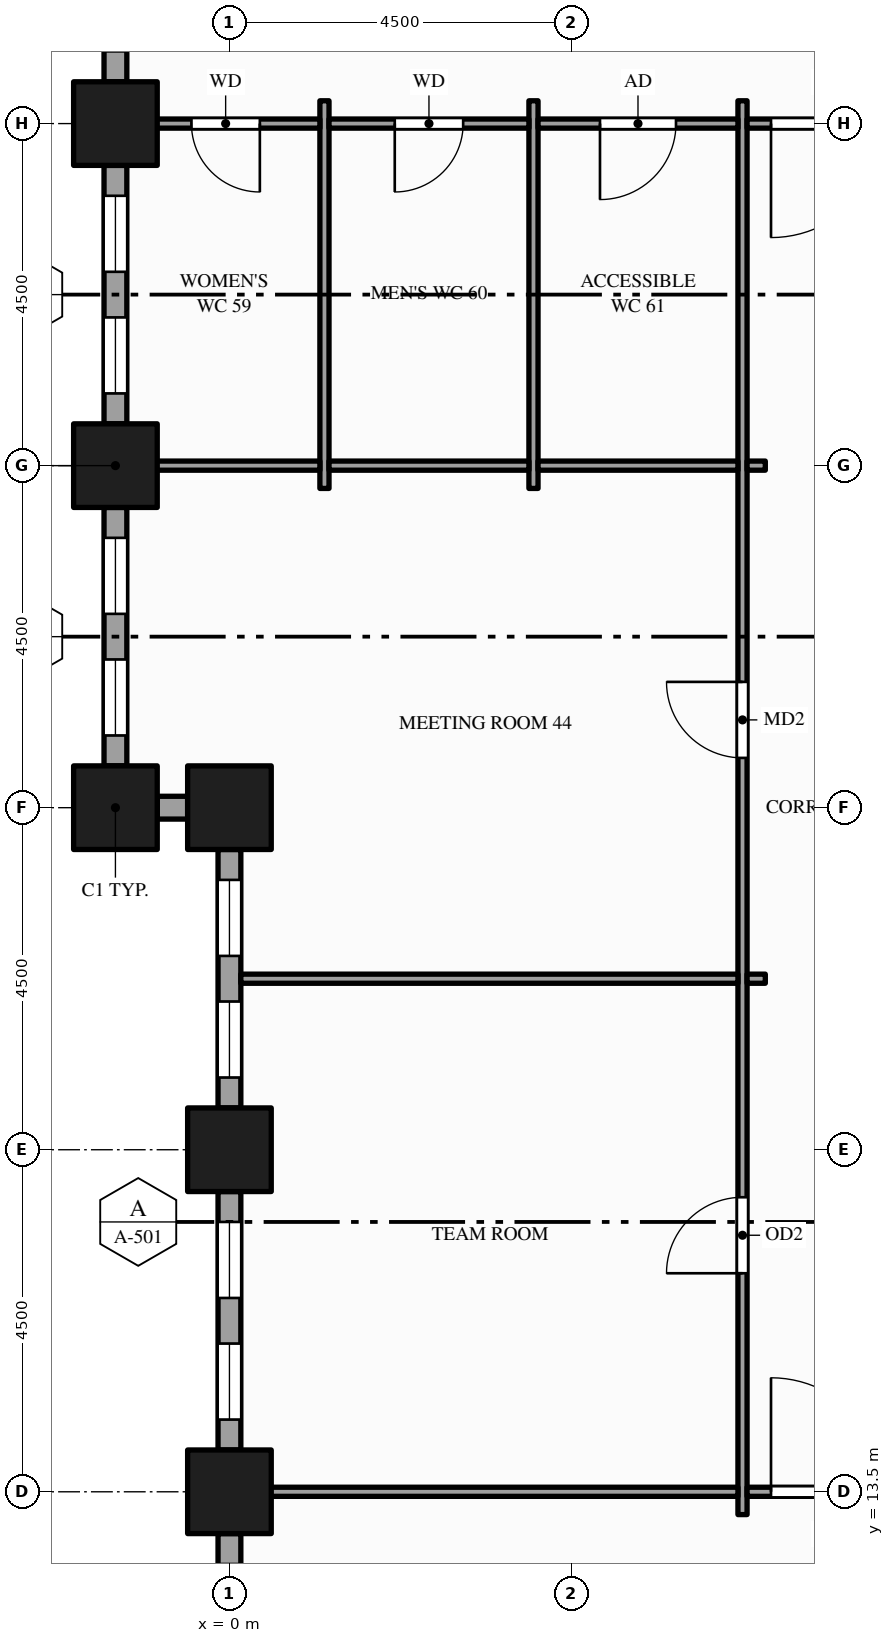
"""IFC4 building model, lengths in metres.
Left out: names, types, materials, properties, quantities, classifications, styles, units other than length and angle.
Written with IfcOpenShell. Run it as: python <this file> out.ifc"""

import sys

from ifc_helpers import new_model, si_unit, direction, frame, frame_2d, origin, origin_2d, place, context, subcontext, project, spatial, rectangle, hollow_rectangle, extrude, element, fill, save


model = new_model("IFC4")
c1 = context("Model", 3, precision=1e-05, world=origin(), true_north=direction((0.0, 1.0)))
c2 = subcontext(c1, "Body", "Model", "MODEL_VIEW")
j1 = project(units=[si_unit("LENGTHUNIT", "METRE"), si_unit("PLANEANGLEUNIT", "RADIAN")], contexts=[c1])
p1 = place(None, origin())
s1 = spatial("IfcSite", under=j1, at=p1, CompositionType="ELEMENT")
p2 = place(p1, origin())
s2 = spatial("IfcBuilding", under=s1, at=p2, CompositionType="ELEMENT")
p3 = place(p2, frame((0.0, 0.0, 41.0)))
s3 = spatial("IfcBuildingStorey", under=s2, at=p3, CompositionType="ELEMENT", Elevation=41.0)
for number, where, z_axis, x_axis in (
    (1, (-1.5, 22.5, -0.15), (0.0, 0.0, 1.0), (1.0, 0.0, 0.0)),
    (2, (-1.5, 27.0, -0.15), (0.0, 0.0, 1.0), (1.0, 0.0, 0.0)),
    (3, (-1.5, 31.5, -0.15), (0.0, 0.0, 1.0), (1.0, 0.0, 0.0)),
    (4, (0.0, 13.5, -0.15), (0.0, 0.0, 1.0), (1.0, 0.0, 0.0)),
    (5, (0.0, 18.0, -0.15), (0.0, 0.0, 1.0), (1.0, 0.0, 0.0)),
    (6, (0.0, 22.5, -0.15), (0.0, 0.0, 1.0), (1.0, 0.0, 0.0)),
):
    element("IfcColumn", number, at=place(p3, frame(where, z_axis=z_axis, x_axis=x_axis)), inside=s3, PredefinedType="COLUMN", context=c2, shape_type="SweptSolid", body=[
        extrude(hollow_rectangle(XDim=1.1, YDim=1.1, WallThickness=0.06, at=origin_2d()), origin(), (0.0, 0.0, 1.0), 4.0),
    ])
p4 = place(p3, frame((-1.5, 35.45, 0.0), z_axis=(0.0, 0.0, 1.0), x_axis=(0.0, -1.0, 0.0)))
e7 = element("IfcWall", 7, at=p4, inside=s3, PredefinedType="STANDARD", context=c2, shape_type="SweptSolid", body=[
    extrude(rectangle(XDim=3.4, YDim=0.3, at=frame_2d((1.7, 0.0))), origin(), (0.0, 0.0, 1.0), 3.144),
])
p5 = place(p4, frame((0.4, 0.0, 0.9)))
e8 = element("IfcOpeningElement", 8, at=p5, cuts=e7, PredefinedType="OPENING", context=c2, shape_type="SweptSolid", body=[
    extrude(rectangle(XDim=1.0, YDim=2.0, at=frame_2d((0.5, 1.0))), frame((0.0, 0.16, 0.0), z_axis=(0.0, -1.0, 0.0), x_axis=(1.0, 0.0, 0.0)), (0.0, 0.0, 1.0), 0.32),
])
p6 = place(p4, frame((2.0, 0.0, 0.9)))
e9 = element("IfcOpeningElement", 9, at=p6, cuts=e7, PredefinedType="OPENING", context=c2, shape_type="SweptSolid", body=[
    extrude(rectangle(XDim=1.0, YDim=2.0, at=frame_2d((0.5, 1.0))), frame((0.0, 0.16, 0.0), z_axis=(0.0, -1.0, 0.0), x_axis=(1.0, 0.0, 0.0)), (0.0, 0.0, 1.0), 0.32),
])
p7 = place(p3, frame((-1.5, 30.95, 0.0), z_axis=(0.0, 0.0, 1.0), x_axis=(0.0, -1.0, 0.0)))
e10 = element("IfcWall", 10, at=p7, inside=s3, PredefinedType="STANDARD", context=c2, shape_type="SweptSolid", body=[
    extrude(rectangle(XDim=3.4, YDim=0.3, at=frame_2d((1.7, 0.0))), origin(), (0.0, 0.0, 1.0), 3.144),
])
p8 = place(p7, frame((0.4, 0.0, 0.9)))
e11 = element("IfcOpeningElement", 11, at=p8, cuts=e10, PredefinedType="OPENING", context=c2, shape_type="SweptSolid", body=[
    extrude(rectangle(XDim=1.0, YDim=2.0, at=frame_2d((0.5, 1.0))), frame((0.0, 0.16, 0.0), z_axis=(0.0, -1.0, 0.0), x_axis=(1.0, 0.0, 0.0)), (0.0, 0.0, 1.0), 0.32),
])
p9 = place(p7, frame((2.0, 0.0, 0.9)))
e12 = element("IfcOpeningElement", 12, at=p9, cuts=e10, PredefinedType="OPENING", context=c2, shape_type="SweptSolid", body=[
    extrude(rectangle(XDim=1.0, YDim=2.0, at=frame_2d((0.5, 1.0))), frame((0.0, 0.16, 0.0), z_axis=(0.0, -1.0, 0.0), x_axis=(1.0, 0.0, 0.0)), (0.0, 0.0, 1.0), 0.32),
])
p10 = place(p3, frame((-1.5, 26.45, 0.0), z_axis=(0.0, 0.0, 1.0), x_axis=(0.0, -1.0, 0.0)))
e13 = element("IfcWall", 13, at=p10, inside=s3, PredefinedType="STANDARD", context=c2, shape_type="SweptSolid", body=[
    extrude(rectangle(XDim=3.4, YDim=0.3, at=frame_2d((1.7, 0.0))), origin(), (0.0, 0.0, 1.0), 3.144),
])
p11 = place(p10, frame((0.4, 0.0, 0.9)))
e14 = element("IfcOpeningElement", 14, at=p11, cuts=e13, PredefinedType="OPENING", context=c2, shape_type="SweptSolid", body=[
    extrude(rectangle(XDim=1.0, YDim=2.0, at=frame_2d((0.5, 1.0))), frame((0.0, 0.16, 0.0), z_axis=(0.0, -1.0, 0.0), x_axis=(1.0, 0.0, 0.0)), (0.0, 0.0, 1.0), 0.32),
])
p12 = place(p10, frame((2.0, 0.0, 0.9)))
e15 = element("IfcOpeningElement", 15, at=p12, cuts=e13, PredefinedType="OPENING", context=c2, shape_type="SweptSolid", body=[
    extrude(rectangle(XDim=1.0, YDim=2.0, at=frame_2d((0.5, 1.0))), frame((0.0, 0.16, 0.0), z_axis=(0.0, -1.0, 0.0), x_axis=(1.0, 0.0, 0.0)), (0.0, 0.0, 1.0), 0.32),
])
p13 = place(p3, frame((-0.95, 22.5, 0.0), z_axis=(0.0, 0.0, 1.0), x_axis=(1.0, 0.0, 0.0)))
e16 = element("IfcWall", 16, at=p13, inside=s3, PredefinedType="STANDARD", context=c2, shape_type="SweptSolid", body=[
    extrude(rectangle(XDim=0.4, YDim=0.3, at=frame_2d((0.2, 0.0))), origin(), (0.0, 0.0, 1.0), 3.144),
])
p14 = place(p3, frame((0.0, 21.95, 0.0), z_axis=(0.0, 0.0, 1.0), x_axis=(0.0, -1.0, 0.0)))
e17 = element("IfcWall", 17, at=p14, inside=s3, PredefinedType="STANDARD", context=c2, shape_type="SweptSolid", body=[
    extrude(rectangle(XDim=3.4, YDim=0.3, at=frame_2d((1.7, 0.0))), origin(), (0.0, 0.0, 1.0), 3.144),
])
p15 = place(p14, frame((0.4, 0.0, 0.9)))
e18 = element("IfcOpeningElement", 18, at=p15, cuts=e17, PredefinedType="OPENING", context=c2, shape_type="SweptSolid", body=[
    extrude(rectangle(XDim=1.0, YDim=2.0, at=frame_2d((0.5, 1.0))), frame((0.0, 0.16, 0.0), z_axis=(0.0, -1.0, 0.0), x_axis=(1.0, 0.0, 0.0)), (0.0, 0.0, 1.0), 0.32),
])
p16 = place(p14, frame((2.0, 0.0, 0.9)))
e19 = element("IfcOpeningElement", 19, at=p16, cuts=e17, PredefinedType="OPENING", context=c2, shape_type="SweptSolid", body=[
    extrude(rectangle(XDim=1.0, YDim=2.0, at=frame_2d((0.5, 1.0))), frame((0.0, 0.16, 0.0), z_axis=(0.0, -1.0, 0.0), x_axis=(1.0, 0.0, 0.0)), (0.0, 0.0, 1.0), 0.32),
])
p17 = place(p3, frame((0.0, 17.45, 0.0), z_axis=(0.0, 0.0, 1.0), x_axis=(0.0, -1.0, 0.0)))
e20 = element("IfcWall", 20, at=p17, inside=s3, PredefinedType="STANDARD", context=c2, shape_type="SweptSolid", body=[
    extrude(rectangle(XDim=3.4, YDim=0.3, at=frame_2d((1.7, 0.0))), origin(), (0.0, 0.0, 1.0), 3.144),
])
p18 = place(p17, frame((0.4, 0.0, 0.9)))
e21 = element("IfcOpeningElement", 21, at=p18, cuts=e20, PredefinedType="OPENING", context=c2, shape_type="SweptSolid", body=[
    extrude(rectangle(XDim=1.0, YDim=2.0, at=frame_2d((0.5, 1.0))), frame((0.0, 0.16, 0.0), z_axis=(0.0, -1.0, 0.0), x_axis=(1.0, 0.0, 0.0)), (0.0, 0.0, 1.0), 0.32),
])
p19 = place(p17, frame((2.0, 0.0, 0.9)))
e22 = element("IfcOpeningElement", 22, at=p19, cuts=e20, PredefinedType="OPENING", context=c2, shape_type="SweptSolid", body=[
    extrude(rectangle(XDim=1.0, YDim=2.0, at=frame_2d((0.5, 1.0))), frame((0.0, 0.16, 0.0), z_axis=(0.0, -1.0, 0.0), x_axis=(1.0, 0.0, 0.0)), (0.0, 0.0, 1.0), 0.32),
])
p20 = place(p3, frame((0.0, 12.95, 0.0), z_axis=(0.0, 0.0, 1.0), x_axis=(0.0, -1.0, 0.0)))
e23 = element("IfcWall", 23, at=p20, inside=s3, PredefinedType="STANDARD", context=c2, shape_type="SweptSolid", body=[
    extrude(rectangle(XDim=3.4, YDim=0.3, at=frame_2d((1.7, 0.0))), origin(), (0.0, 0.0, 1.0), 3.144),
])
p21 = place(p20, frame((0.4, 0.0, 0.9)))
e24 = element("IfcOpeningElement", 24, at=p21, cuts=e23, PredefinedType="OPENING", context=c2, shape_type="SweptSolid", body=[
    extrude(rectangle(XDim=1.0, YDim=2.0, at=frame_2d((0.5, 1.0))), frame((0.0, 0.16, 0.0), z_axis=(0.0, -1.0, 0.0), x_axis=(1.0, 0.0, 0.0)), (0.0, 0.0, 1.0), 0.32),
])
p22 = place(p20, frame((2.0, 0.0, 0.9)))
e25 = element("IfcOpeningElement", 25, at=p22, cuts=e23, PredefinedType="OPENING", context=c2, shape_type="SweptSolid", body=[
    extrude(rectangle(XDim=1.0, YDim=2.0, at=frame_2d((0.5, 1.0))), frame((0.0, 0.16, 0.0), z_axis=(0.0, -1.0, 0.0), x_axis=(1.0, 0.0, 0.0)), (0.0, 0.0, 1.0), 0.32),
])
for number, where, z_axis, x_axis in (
    (26, (1.25, 26.7, 0.0), (0.0, 0.0, 1.0), (0.0, 1.0, 0.0)),
    (27, (4.0, 26.7, 0.0), (0.0, 0.0, 1.0), (0.0, 1.0, 0.0)),
):
    element("IfcWall", number, at=place(p3, frame(where, z_axis=z_axis, x_axis=x_axis)), inside=s3, PredefinedType="PARTITIONING", context=c2, shape_type="SweptSolid", body=[
        extrude(rectangle(XDim=5.1, YDim=0.12, at=frame_2d((2.55, 0.0))), origin(), (0.0, 0.0, 1.0), 3.85),
    ])
p23 = place(p3, frame((6.75, 13.2, 0.0), z_axis=(0.0, 0.0, 1.0), x_axis=(0.0, 1.0, 0.0)))
e28 = element("IfcWall", 28, at=p23, inside=s3, PredefinedType="PARTITIONING", context=c2, shape_type="SweptSolid", body=[
    extrude(rectangle(XDim=18.6, YDim=0.12, at=frame_2d((9.3, 0.0))), origin(), (0.0, 0.0, 1.0), 2.6),
])
p24 = place(p23, frame((3.175, 0.0, 0.0)))
e29 = element("IfcOpeningElement", 29, at=p24, cuts=e28, PredefinedType="OPENING", context=c2, shape_type="SweptSolid", body=[
    extrude(rectangle(XDim=1.0, YDim=2.1, at=frame_2d((0.5, 1.05))), frame((0.0, 0.07, 0.0), z_axis=(0.0, -1.0, 0.0), x_axis=(1.0, 0.0, 0.0)), (0.0, 0.0, 1.0), 0.14),
])
p25 = place(p23, frame((9.955, 0.0, 0.0)))
e30 = element("IfcOpeningElement", 30, at=p25, cuts=e28, PredefinedType="OPENING", context=c2, shape_type="SweptSolid", body=[
    extrude(rectangle(XDim=1.0, YDim=2.1, at=frame_2d((0.5, 1.05))), frame((0.0, 0.07, 0.0), z_axis=(0.0, -1.0, 0.0), x_axis=(1.0, 0.0, 0.0)), (0.0, 0.0, 1.0), 0.14),
])
p26 = place(p3, frame((0.15, 13.5, 0.0), z_axis=(0.0, 0.0, 1.0), x_axis=(1.0, 0.0, 0.0)))
e31 = element("IfcWall", 31, at=p26, inside=s3, PredefinedType="PARTITIONING", context=c2, shape_type="SweptSolid", body=[
    extrude(rectangle(XDim=6.54, YDim=0.12, at=frame_2d((3.27, 0.0))), origin(), (0.0, 0.0, 1.0), 2.938),
])
p27 = place(p3, frame((6.81, 13.5, 0.0), z_axis=(0.0, 0.0, 1.0), x_axis=(1.0, 0.0, 0.0)))
e32 = element("IfcWall", 32, at=p27, inside=s3, PredefinedType="PARTITIONING", context=c2, shape_type="SweptSolid", body=[
    extrude(rectangle(XDim=2.13, YDim=0.12, at=frame_2d((1.065, 0.0))), origin(), (0.0, 0.0, 1.0), 2.938),
])
p28 = place(p27, frame((0.315, 0.0, 0.0)))
e33 = element("IfcOpeningElement", 33, at=p28, cuts=e32, PredefinedType="OPENING", context=c2, shape_type="SweptSolid", body=[
    extrude(rectangle(XDim=1.5, YDim=2.1, at=frame_2d((0.75, 1.05))), frame((0.0, 0.07, 0.0), z_axis=(0.0, -1.0, 0.0), x_axis=(1.0, 0.0, 0.0)), (0.0, 0.0, 1.0), 0.14),
])
p29 = place(p3, frame((0.15, 20.25, 0.0), z_axis=(0.0, 0.0, 1.0), x_axis=(1.0, 0.0, 0.0)))
e34 = element("IfcWall", 34, at=p29, inside=s3, PredefinedType="PARTITIONING", context=c2, shape_type="SweptSolid", body=[
    extrude(rectangle(XDim=6.54, YDim=0.12, at=frame_2d((3.27, 0.0))), origin(), (0.0, 0.0, 1.0), 2.938),
])
p30 = place(p3, frame((6.81, 20.25, 0.0), z_axis=(0.0, 0.0, 1.0), x_axis=(1.0, 0.0, 0.0)))
e35 = element("IfcWall", 35, at=p30, inside=s3, PredefinedType="PARTITIONING", context=c2, shape_type="SweptSolid", body=[
    extrude(rectangle(XDim=0.24, YDim=0.12, at=frame_2d((0.12, 0.0))), origin(), (0.0, 0.0, 1.0), 2.938),
])
p31 = place(p3, frame((-1.35, 27.0, 0.0), z_axis=(0.0, 0.0, 1.0), x_axis=(1.0, 0.0, 0.0)))
e36 = element("IfcWall", 36, at=p31, inside=s3, PredefinedType="PARTITIONING", context=c2, shape_type="SweptSolid", body=[
    extrude(rectangle(XDim=2.54, YDim=0.12, at=frame_2d((1.27, 0.0))), origin(), (0.0, 0.0, 1.0), 2.938),
])
for number, where, z_axis, x_axis in (
    (37, (1.31, 27.0, 0.0), (0.0, 0.0, 1.0), (1.0, 0.0, 0.0)),
    (38, (4.06, 27.0, 0.0), (0.0, 0.0, 1.0), (1.0, 0.0, 0.0)),
):
    element("IfcWall", number, at=place(p3, frame(where, z_axis=z_axis, x_axis=x_axis)), inside=s3, PredefinedType="PARTITIONING", context=c2, shape_type="SweptSolid", body=[
        extrude(rectangle(XDim=2.63, YDim=0.12, at=frame_2d((1.315, 0.0))), origin(), (0.0, 0.0, 1.0), 2.938),
    ])
p32 = place(p3, frame((6.81, 27.0, 0.0), z_axis=(0.0, 0.0, 1.0), x_axis=(1.0, 0.0, 0.0)))
e39 = element("IfcWall", 39, at=p32, inside=s3, PredefinedType="PARTITIONING", context=c2, shape_type="SweptSolid", body=[
    extrude(rectangle(XDim=0.24, YDim=0.12, at=frame_2d((0.12, 0.0))), origin(), (0.0, 0.0, 1.0), 2.938),
])
p33 = place(p3, frame((-1.35, 31.5, 0.0), z_axis=(0.0, 0.0, 1.0), x_axis=(1.0, 0.0, 0.0)))
e40 = element("IfcWall", 40, at=p33, inside=s3, PredefinedType="PARTITIONING", context=c2, shape_type="SweptSolid", body=[
    extrude(rectangle(XDim=2.54, YDim=0.12, at=frame_2d((1.27, 0.0))), origin(), (0.0, 0.0, 1.0), 2.938),
])
p34 = place(p33, frame((0.85, 0.0, 0.0)))
e41 = element("IfcOpeningElement", 41, at=p34, cuts=e40, PredefinedType="OPENING", context=c2, shape_type="SweptSolid", body=[
    extrude(rectangle(XDim=0.9, YDim=2.1, at=frame_2d((0.45, 1.05))), frame((0.0, 0.07, 0.0), z_axis=(0.0, -1.0, 0.0), x_axis=(1.0, 0.0, 0.0)), (0.0, 0.0, 1.0), 0.14),
])
p35 = place(p3, frame((1.31, 31.5, 0.0), z_axis=(0.0, 0.0, 1.0), x_axis=(1.0, 0.0, 0.0)))
e42 = element("IfcWall", 42, at=p35, inside=s3, PredefinedType="PARTITIONING", context=c2, shape_type="SweptSolid", body=[
    extrude(rectangle(XDim=2.63, YDim=0.12, at=frame_2d((1.315, 0.0))), origin(), (0.0, 0.0, 1.0), 2.938),
])
p36 = place(p35, frame((0.865, 0.0, 0.0)))
e43 = element("IfcOpeningElement", 43, at=p36, cuts=e42, PredefinedType="OPENING", context=c2, shape_type="SweptSolid", body=[
    extrude(rectangle(XDim=0.9, YDim=2.1, at=frame_2d((0.45, 1.05))), frame((0.0, 0.07, 0.0), z_axis=(0.0, -1.0, 0.0), x_axis=(1.0, 0.0, 0.0)), (0.0, 0.0, 1.0), 0.14),
])
p37 = place(p3, frame((4.06, 31.5, 0.0), z_axis=(0.0, 0.0, 1.0), x_axis=(1.0, 0.0, 0.0)))
e44 = element("IfcWall", 44, at=p37, inside=s3, PredefinedType="PARTITIONING", context=c2, shape_type="SweptSolid", body=[
    extrude(rectangle(XDim=2.63, YDim=0.12, at=frame_2d((1.315, 0.0))), origin(), (0.0, 0.0, 1.0), 2.938),
])
p38 = place(p37, frame((0.815, 0.0, 0.0)))
e45 = element("IfcOpeningElement", 45, at=p38, cuts=e44, PredefinedType="OPENING", context=c2, shape_type="SweptSolid", body=[
    extrude(rectangle(XDim=1.0, YDim=2.1, at=frame_2d((0.5, 1.05))), frame((0.0, 0.07, 0.0), z_axis=(0.0, -1.0, 0.0), x_axis=(1.0, 0.0, 0.0)), (0.0, 0.0, 1.0), 0.14),
])
p39 = place(p3, frame((6.81, 31.5, 0.0), z_axis=(0.0, 0.0, 1.0), x_axis=(1.0, 0.0, 0.0)))
e46 = element("IfcWall", 46, at=p39, inside=s3, PredefinedType="PARTITIONING", context=c2, shape_type="SweptSolid", body=[
    extrude(rectangle(XDim=2.13, YDim=0.12, at=frame_2d((1.065, 0.0))), origin(), (0.0, 0.0, 1.0), 2.938),
])
p40 = place(p39, frame((0.315, 0.0, 0.0)))
e47 = element("IfcOpeningElement", 47, at=p40, cuts=e46, PredefinedType="OPENING", context=c2, shape_type="SweptSolid", body=[
    extrude(rectangle(XDim=1.5, YDim=2.1, at=frame_2d((0.75, 1.05))), frame((0.0, 0.07, 0.0), z_axis=(0.0, -1.0, 0.0), x_axis=(1.0, 0.0, 0.0)), (0.0, 0.0, 1.0), 0.14),
])
p41 = place(p8, origin())
e48 = element("IfcWindow", 48, at=p41, inside=s3, PartitioningType="SINGLE_PANEL", PredefinedType="WINDOW", context=c2, shape_type="SweptSolid", body=[
    extrude(rectangle(XDim=1.0, YDim=2.0, at=frame_2d((0.5, 1.0))), frame((0.0, 0.03, 0.0), z_axis=(0.0, -1.0, 0.0), x_axis=(1.0, 0.0, 0.0)), (0.0, 0.0, 1.0), 0.06),
])
fill(e11, e48)
p42 = place(p9, origin())
e49 = element("IfcWindow", 49, at=p42, inside=s3, PartitioningType="SINGLE_PANEL", PredefinedType="WINDOW", context=c2, shape_type="SweptSolid", body=[
    extrude(rectangle(XDim=1.0, YDim=2.0, at=frame_2d((0.5, 1.0))), frame((0.0, 0.03, 0.0), z_axis=(0.0, -1.0, 0.0), x_axis=(1.0, 0.0, 0.0)), (0.0, 0.0, 1.0), 0.06),
])
fill(e12, e49)
p43 = place(p11, origin())
e50 = element("IfcWindow", 50, at=p43, inside=s3, PartitioningType="SINGLE_PANEL", PredefinedType="WINDOW", context=c2, shape_type="SweptSolid", body=[
    extrude(rectangle(XDim=1.0, YDim=2.0, at=frame_2d((0.5, 1.0))), frame((0.0, 0.03, 0.0), z_axis=(0.0, -1.0, 0.0), x_axis=(1.0, 0.0, 0.0)), (0.0, 0.0, 1.0), 0.06),
])
fill(e14, e50)
p44 = place(p12, origin())
e51 = element("IfcWindow", 51, at=p44, inside=s3, PartitioningType="SINGLE_PANEL", PredefinedType="WINDOW", context=c2, shape_type="SweptSolid", body=[
    extrude(rectangle(XDim=1.0, YDim=2.0, at=frame_2d((0.5, 1.0))), frame((0.0, 0.03, 0.0), z_axis=(0.0, -1.0, 0.0), x_axis=(1.0, 0.0, 0.0)), (0.0, 0.0, 1.0), 0.06),
])
fill(e15, e51)
p45 = place(p15, origin())
e52 = element("IfcWindow", 52, at=p45, inside=s3, PartitioningType="SINGLE_PANEL", PredefinedType="WINDOW", context=c2, shape_type="SweptSolid", body=[
    extrude(rectangle(XDim=1.0, YDim=2.0, at=frame_2d((0.5, 1.0))), frame((0.0, 0.03, 0.0), z_axis=(0.0, -1.0, 0.0), x_axis=(1.0, 0.0, 0.0)), (0.0, 0.0, 1.0), 0.06),
])
fill(e18, e52)
p46 = place(p16, origin())
e53 = element("IfcWindow", 53, at=p46, inside=s3, PartitioningType="SINGLE_PANEL", PredefinedType="WINDOW", context=c2, shape_type="SweptSolid", body=[
    extrude(rectangle(XDim=1.0, YDim=2.0, at=frame_2d((0.5, 1.0))), frame((0.0, 0.03, 0.0), z_axis=(0.0, -1.0, 0.0), x_axis=(1.0, 0.0, 0.0)), (0.0, 0.0, 1.0), 0.06),
])
fill(e19, e53)
p47 = place(p18, origin())
e54 = element("IfcWindow", 54, at=p47, inside=s3, PartitioningType="SINGLE_PANEL", PredefinedType="WINDOW", context=c2, shape_type="SweptSolid", body=[
    extrude(rectangle(XDim=1.0, YDim=2.0, at=frame_2d((0.5, 1.0))), frame((0.0, 0.03, 0.0), z_axis=(0.0, -1.0, 0.0), x_axis=(1.0, 0.0, 0.0)), (0.0, 0.0, 1.0), 0.06),
])
fill(e21, e54)
p48 = place(p19, origin())
e55 = element("IfcWindow", 55, at=p48, inside=s3, PartitioningType="SINGLE_PANEL", PredefinedType="WINDOW", context=c2, shape_type="SweptSolid", body=[
    extrude(rectangle(XDim=1.0, YDim=2.0, at=frame_2d((0.5, 1.0))), frame((0.0, 0.03, 0.0), z_axis=(0.0, -1.0, 0.0), x_axis=(1.0, 0.0, 0.0)), (0.0, 0.0, 1.0), 0.06),
])
fill(e22, e55)
p49 = place(p28, origin())
e56 = element("IfcDoor", 56, at=p49, inside=s3, OperationType="SINGLE_SWING_LEFT", PredefinedType="DOOR", context=c2, shape_type="SweptSolid", body=[
    extrude(rectangle(XDim=1.5, YDim=2.1, at=frame_2d((0.75, 1.05))), frame((0.0, 0.025, 0.0), z_axis=(0.0, -1.0, 0.0), x_axis=(1.0, 0.0, 0.0)), (0.0, 0.0, 1.0), 0.05),
])
fill(e33, e56)
p50 = place(p40, origin())
e57 = element("IfcDoor", 57, at=p50, inside=s3, OperationType="SINGLE_SWING_LEFT", PredefinedType="DOOR", context=c2, shape_type="SweptSolid", body=[
    extrude(rectangle(XDim=1.5, YDim=2.1, at=frame_2d((0.75, 1.05))), frame((0.0, 0.025, 0.0), z_axis=(0.0, -1.0, 0.0), x_axis=(1.0, 0.0, 0.0)), (0.0, 0.0, 1.0), 0.05),
])
fill(e47, e57)
p51 = place(p24, origin())
e58 = element("IfcDoor", 58, at=p51, inside=s3, OperationType="SINGLE_SWING_LEFT", PredefinedType="DOOR", context=c2, shape_type="SweptSolid", body=[
    extrude(rectangle(XDim=1.0, YDim=2.1, at=frame_2d((0.5, 1.05))), frame((0.0, 0.025, 0.0), z_axis=(0.0, -1.0, 0.0), x_axis=(1.0, 0.0, 0.0)), (0.0, 0.0, 1.0), 0.05),
])
fill(e29, e58)
p52 = place(p25, origin())
e59 = element("IfcDoor", 59, at=p52, inside=s3, OperationType="SINGLE_SWING_RIGHT", PredefinedType="DOOR", context=c2, shape_type="SweptSolid", body=[
    extrude(rectangle(XDim=1.0, YDim=2.1, at=frame_2d((0.5, 1.05))), frame((0.0, 0.025, 0.0), z_axis=(0.0, -1.0, 0.0), x_axis=(1.0, 0.0, 0.0)), (0.0, 0.0, 1.0), 0.05),
])
fill(e30, e59)
p53 = place(p34, origin())
e60 = element("IfcDoor", 60, at=p53, inside=s3, OperationType="SINGLE_SWING_RIGHT", PredefinedType="DOOR", context=c2, shape_type="SweptSolid", body=[
    extrude(rectangle(XDim=0.9, YDim=2.1, at=frame_2d((0.45, 1.05))), frame((0.0, 0.025, 0.0), z_axis=(0.0, -1.0, 0.0), x_axis=(1.0, 0.0, 0.0)), (0.0, 0.0, 1.0), 0.05),
])
fill(e41, e60)
p54 = place(p36, origin())
e61 = element("IfcDoor", 61, at=p54, inside=s3, OperationType="SINGLE_SWING_LEFT", PredefinedType="DOOR", context=c2, shape_type="SweptSolid", body=[
    extrude(rectangle(XDim=0.9, YDim=2.1, at=frame_2d((0.45, 1.05))), frame((0.0, 0.025, 0.0), z_axis=(0.0, -1.0, 0.0), x_axis=(1.0, 0.0, 0.0)), (0.0, 0.0, 1.0), 0.05),
])
fill(e43, e61)
p55 = place(p38, origin())
e62 = element("IfcDoor", 62, at=p55, inside=s3, OperationType="SINGLE_SWING_LEFT", PredefinedType="DOOR", context=c2, shape_type="SweptSolid", body=[
    extrude(rectangle(XDim=1.0, YDim=2.1, at=frame_2d((0.5, 1.05))), frame((0.0, 0.025, 0.0), z_axis=(0.0, -1.0, 0.0), x_axis=(1.0, 0.0, 0.0)), (0.0, 0.0, 1.0), 0.05),
])
fill(e45, e62)
save(model, sys.argv[1])
